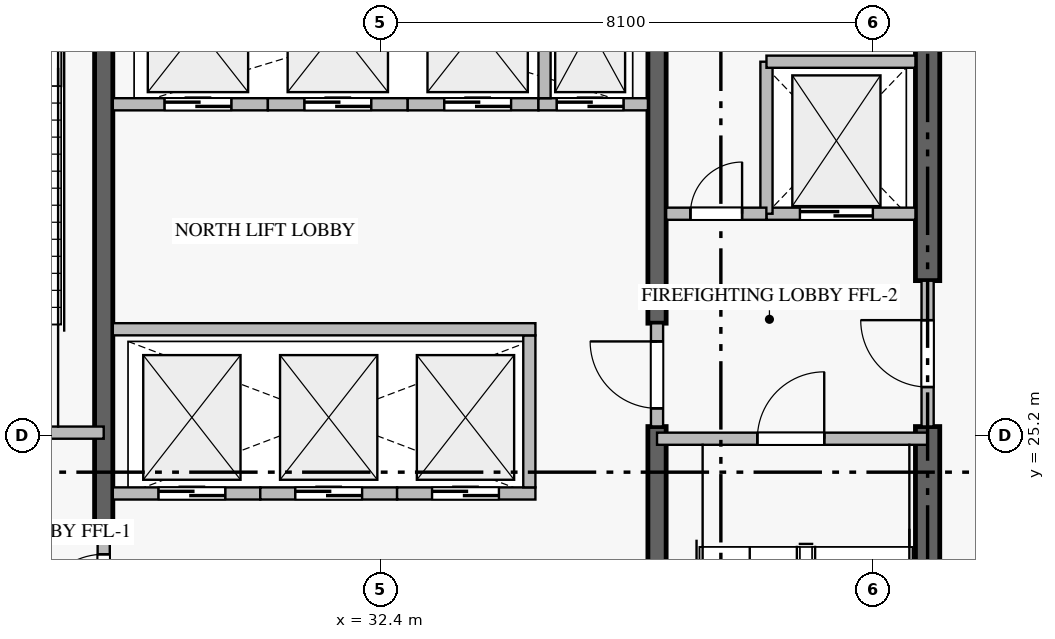
"""IFC4 building model, lengths in metres.
Left out: names, types, materials, properties, quantities, classifications, styles, units other than length and angle.
Written with IfcOpenShell. Run it as: python <this file> out.ifc"""

import sys

from ifc_helpers import new_model, si_unit, direction, frame, frame_2d, origin, place, context, subcontext, project, spatial, rectangle, extrude, source, transform, mapped, element, fill, save


model = new_model("IFC4")
c1 = context("Model", 3, precision=1e-05, world=origin(), true_north=direction((0.0, 1.0)))
c2 = subcontext(c1, "Body", "Model", "MODEL_VIEW")
j1 = project(units=[si_unit("LENGTHUNIT", "METRE"), si_unit("PLANEANGLEUNIT", "RADIAN")], contexts=[c1])
p1 = place(None, origin())
s1 = spatial("IfcSite", under=j1, at=p1, CompositionType="ELEMENT")
p2 = place(p1, origin())
s2 = spatial("IfcBuilding", under=s1, at=p2, CompositionType="ELEMENT")
p3 = place(p2, frame((0.0, 0.0, 204.9)))
s3 = spatial("IfcBuildingStorey", under=s2, at=p3, CompositionType="ELEMENT", Elevation=204.9)
p4 = place(p3, frame((41.4, 17.0, -0.36), z_axis=(0.0, 0.0, 1.0), x_axis=(0.0, 1.0, 0.0)))
e1 = element("IfcWall", 1, at=p4, inside=s3, PredefinedType="SHEAR", context=c2, shape_type="SweptSolid", body=[
    extrude(rectangle(XDim=8.35, YDim=0.4, at=frame_2d((4.175, 0.0))), origin(), (0.0, 0.0, 1.0), 5.468),
])
p5 = place(p3, frame((41.4, 27.75, -0.36), z_axis=(0.0, 0.0, 1.0), x_axis=(0.0, 1.0, 0.0)))
e2 = element("IfcWall", 2, at=p5, inside=s3, PredefinedType="SHEAR", context=c2, shape_type="SweptSolid", body=[
    extrude(rectangle(XDim=5.65, YDim=0.4, at=frame_2d((2.825, 0.0))), origin(), (0.0, 0.0, 1.0), 5.468),
])
p6 = place(p3, frame((27.85, 23.55, -0.36), z_axis=(0.0, 0.0, 1.0), x_axis=(0.0, 1.0, 0.0)))
e3 = element("IfcWall", 3, at=p6, inside=s3, PredefinedType="SHEAR", context=c2, shape_type="SweptSolid", body=[
    extrude(rectangle(XDim=9.85, YDim=0.3, at=frame_2d((4.925, 0.0))), origin(), (0.0, 0.0, 1.0), 5.468),
])
p7 = place(p3, frame((36.95, 17.0, -0.36), z_axis=(0.0, 0.0, 1.0), x_axis=(0.0, 1.0, 0.0)))
e4 = element("IfcWall", 4, at=p7, inside=s3, PredefinedType="SHEAR", context=c2, shape_type="SweptSolid", body=[
    extrude(rectangle(XDim=8.35, YDim=0.3, at=frame_2d((4.175, 0.0))), origin(), (0.0, 0.0, 1.0), 5.468),
])
p8 = place(p3, frame((36.95, 27.05, -0.36), z_axis=(0.0, 0.0, 1.0), x_axis=(0.0, 1.0, 0.0)))
e5 = element("IfcWall", 5, at=p8, inside=s3, PredefinedType="SHEAR", context=c2, shape_type="SweptSolid", body=[
    extrude(rectangle(XDim=6.35, YDim=0.3, at=frame_2d((3.175, 0.0))), origin(), (0.0, 0.0, 1.0), 5.468),
])
p9 = place(p3, frame((23.4, 25.25, 0.0), z_axis=(0.0, 0.0, 1.0), x_axis=(1.0, 0.0, 0.0)))
e6 = element("IfcWall", 6, at=p9, inside=s3, PredefinedType="STANDARD", context=c2, shape_type="SweptSolid", body=[
    extrude(rectangle(XDim=4.45, YDim=0.2, at=frame_2d((2.225, 0.0))), origin(), (0.0, 0.0, 1.0), 5.11),
])
p10 = place(p9, frame((1.65, 0.0, 0.0)))
e7 = element("IfcOpeningElement", 7, at=p10, cuts=e6, PredefinedType="OPENING", context=c2, shape_type="SweptSolid", body=[
    extrude(rectangle(XDim=1.1, YDim=2.15, at=frame_2d((0.55, 1.075))), frame((0.0, 0.11, 0.0), z_axis=(0.0, -1.0, 0.0), x_axis=(1.0, 0.0, 0.0)), (0.0, 0.0, 1.0), 0.22),
])
p11 = place(p3, frame((36.95, 25.15, 0.0), z_axis=(0.0, 0.0, 1.0), x_axis=(1.0, 0.0, 0.0)))
e8 = element("IfcWall", 8, at=p11, inside=s3, PredefinedType="STANDARD", context=c2, shape_type="SweptSolid", body=[
    extrude(rectangle(XDim=4.45, YDim=0.2, at=frame_2d((2.225, 0.0))), origin(), (0.0, 0.0, 1.0), 5.11),
])
p12 = place(p11, frame((1.65, 0.0, 0.0)))
e9 = element("IfcOpeningElement", 9, at=p12, cuts=e8, PredefinedType="OPENING", context=c2, shape_type="SweptSolid", body=[
    extrude(rectangle(XDim=1.1, YDim=2.15, at=frame_2d((0.55, 1.075))), frame((0.0, 0.11, 0.0), z_axis=(0.0, -1.0, 0.0), x_axis=(1.0, 0.0, 0.0)), (0.0, 0.0, 1.0), 0.22),
])
p13 = place(p3, frame((38.75, 28.85, 0.0), z_axis=(0.0, 0.0, 1.0), x_axis=(1.0, 0.0, 0.0)))
e10 = element("IfcWall", 10, at=p13, inside=s3, PredefinedType="STANDARD", context=c2, shape_type="SweptSolid", body=[
    extrude(rectangle(XDim=2.45, YDim=0.2, at=frame_2d((1.225, 0.0))), origin(), (0.0, 0.0, 1.0), 5.11),
])
p14 = place(p13, frame((0.55, 0.0, 0.0)))
e11 = element("IfcOpeningElement", 11, at=p14, cuts=e10, PredefinedType="OPENING", context=c2, shape_type="SweptSolid", body=[
    extrude(rectangle(XDim=1.2, YDim=2.2, at=frame_2d((0.6, 1.1))), frame((0.0, 0.11, 0.0), z_axis=(0.0, -1.0, 0.0), x_axis=(1.0, 0.0, 0.0)), (0.0, 0.0, 1.0), 0.22),
])
p15 = place(p3, frame((28.0, 24.25, 0.0), z_axis=(0.0, 0.0, 1.0), x_axis=(1.0, 0.0, 0.0)))
e12 = element("IfcWall", 12, at=p15, inside=s3, PredefinedType="STANDARD", context=c2, shape_type="SweptSolid", body=[
    extrude(rectangle(XDim=2.425, YDim=0.2, at=frame_2d((1.212, 0.0))), origin(), (0.0, 0.0, 1.0), 5.11),
])
p16 = place(p15, frame((0.75, 0.0, 0.0)))
e13 = element("IfcOpeningElement", 13, at=p16, cuts=e12, PredefinedType="OPENING", context=c2, shape_type="SweptSolid", body=[
    extrude(rectangle(XDim=1.1, YDim=2.2, at=frame_2d((0.55, 1.1))), frame((0.0, 0.11, 0.0), z_axis=(0.0, -1.0, 0.0), x_axis=(1.0, 0.0, 0.0)), (0.0, 0.0, 1.0), 0.22),
])
p17 = place(p3, frame((30.425, 24.25, 0.0), z_axis=(0.0, 0.0, 1.0), x_axis=(1.0, 0.0, 0.0)))
e14 = element("IfcWall", 14, at=p17, inside=s3, PredefinedType="STANDARD", context=c2, shape_type="SweptSolid", body=[
    extrude(rectangle(XDim=2.25, YDim=0.2, at=frame_2d((1.125, 0.0))), origin(), (0.0, 0.0, 1.0), 5.11),
])
p18 = place(p17, frame((0.575, 0.0, 0.0)))
e15 = element("IfcOpeningElement", 15, at=p18, cuts=e14, PredefinedType="OPENING", context=c2, shape_type="SweptSolid", body=[
    extrude(rectangle(XDim=1.1, YDim=2.2, at=frame_2d((0.55, 1.1))), frame((0.0, 0.11, 0.0), z_axis=(0.0, -1.0, 0.0), x_axis=(1.0, 0.0, 0.0)), (0.0, 0.0, 1.0), 0.22),
])
p19 = place(p3, frame((32.675, 24.25, 0.0), z_axis=(0.0, 0.0, 1.0), x_axis=(1.0, 0.0, 0.0)))
e16 = element("IfcWall", 16, at=p19, inside=s3, PredefinedType="STANDARD", context=c2, shape_type="SweptSolid", body=[
    extrude(rectangle(XDim=2.275, YDim=0.2, at=frame_2d((1.137, 0.0))), origin(), (0.0, 0.0, 1.0), 5.11),
])
p20 = place(p19, frame((0.575, 0.0, 0.0)))
e17 = element("IfcOpeningElement", 17, at=p20, cuts=e16, PredefinedType="OPENING", context=c2, shape_type="SweptSolid", body=[
    extrude(rectangle(XDim=1.1, YDim=2.2, at=frame_2d((0.55, 1.1))), frame((0.0, 0.11, 0.0), z_axis=(0.0, -1.0, 0.0), x_axis=(1.0, 0.0, 0.0)), (0.0, 0.0, 1.0), 0.22),
])
p21 = place(p3, frame((34.85, 24.35, 0.0), z_axis=(0.0, 0.0, 1.0), x_axis=(0.0, 1.0, 0.0)))
e18 = element("IfcWall", 18, at=p21, inside=s3, PredefinedType="STANDARD", context=c2, shape_type="SweptSolid", body=[
    extrude(rectangle(XDim=2.5, YDim=0.2, at=frame_2d((1.25, 0.0))), origin(), (0.0, 0.0, 1.0), 5.11),
])
p22 = place(p3, frame((28.0, 30.65, 0.0), z_axis=(0.0, 0.0, 1.0), x_axis=(1.0, 0.0, 0.0)))
e19 = element("IfcWall", 19, at=p22, inside=s3, PredefinedType="STANDARD", context=c2, shape_type="SweptSolid", body=[
    extrude(rectangle(XDim=2.55, YDim=0.2, at=frame_2d((1.275, 0.0))), origin(), (0.0, 0.0, 1.0), 5.11),
])
p23 = place(p22, frame((0.85, 0.0, 0.0)))
e20 = element("IfcOpeningElement", 20, at=p23, cuts=e19, PredefinedType="OPENING", context=c2, shape_type="SweptSolid", body=[
    extrude(rectangle(XDim=1.1, YDim=2.2, at=frame_2d((0.55, 1.1))), frame((0.0, 0.11, 0.0), z_axis=(0.0, -1.0, 0.0), x_axis=(1.0, 0.0, 0.0)), (0.0, 0.0, 1.0), 0.22),
])
p24 = place(p3, frame((30.55, 30.65, 0.0), z_axis=(0.0, 0.0, 1.0), x_axis=(1.0, 0.0, 0.0)))
e21 = element("IfcWall", 21, at=p24, inside=s3, PredefinedType="STANDARD", context=c2, shape_type="SweptSolid", body=[
    extrude(rectangle(XDim=2.3, YDim=0.2, at=frame_2d((1.15, 0.0))), origin(), (0.0, 0.0, 1.0), 5.11),
])
p25 = place(p24, frame((0.6, 0.0, 0.0)))
e22 = element("IfcOpeningElement", 22, at=p25, cuts=e21, PredefinedType="OPENING", context=c2, shape_type="SweptSolid", body=[
    extrude(rectangle(XDim=1.1, YDim=2.2, at=frame_2d((0.55, 1.1))), frame((0.0, 0.11, 0.0), z_axis=(0.0, -1.0, 0.0), x_axis=(1.0, 0.0, 0.0)), (0.0, 0.0, 1.0), 0.22),
])
p26 = place(p3, frame((32.85, 30.65, 0.0), z_axis=(0.0, 0.0, 1.0), x_axis=(1.0, 0.0, 0.0)))
e23 = element("IfcWall", 23, at=p26, inside=s3, PredefinedType="STANDARD", context=c2, shape_type="SweptSolid", body=[
    extrude(rectangle(XDim=2.15, YDim=0.2, at=frame_2d((1.075, 0.0))), origin(), (0.0, 0.0, 1.0), 5.11),
])
p27 = place(p26, frame((0.6, 0.0, 0.0)))
e24 = element("IfcOpeningElement", 24, at=p27, cuts=e23, PredefinedType="OPENING", context=c2, shape_type="SweptSolid", body=[
    extrude(rectangle(XDim=1.1, YDim=2.2, at=frame_2d((0.55, 1.1))), frame((0.0, 0.11, 0.0), z_axis=(0.0, -1.0, 0.0), x_axis=(1.0, 0.0, 0.0)), (0.0, 0.0, 1.0), 0.22),
])
p28 = place(p3, frame((35.0, 30.65, 0.0), z_axis=(0.0, 0.0, 1.0), x_axis=(1.0, 0.0, 0.0)))
e25 = element("IfcWall", 25, at=p28, inside=s3, PredefinedType="STANDARD", context=c2, shape_type="SweptSolid", body=[
    extrude(rectangle(XDim=1.8, YDim=0.2, at=frame_2d((0.9, 0.0))), origin(), (0.0, 0.0, 1.0), 5.11),
])
p29 = place(p28, frame((0.3, 0.0, 0.0)))
e26 = element("IfcOpeningElement", 26, at=p29, cuts=e25, PredefinedType="OPENING", context=c2, shape_type="SweptSolid", body=[
    extrude(rectangle(XDim=1.1, YDim=2.2, at=frame_2d((0.55, 1.1))), frame((0.0, 0.11, 0.0), z_axis=(0.0, -1.0, 0.0), x_axis=(1.0, 0.0, 0.0)), (0.0, 0.0, 1.0), 0.22),
])
p30 = place(p3, frame((35.1, 30.75, 0.0), z_axis=(0.0, 0.0, 1.0), x_axis=(0.0, 1.0, 0.0)))
e27 = element("IfcWall", 27, at=p30, inside=s3, PredefinedType="STANDARD", context=c2, shape_type="SweptSolid", body=[
    extrude(rectangle(XDim=2.65, YDim=0.2, at=frame_2d((1.325, 0.0))), origin(), (0.0, 0.0, 1.0), 5.11),
])
p31 = place(p3, frame((38.75, 28.85, 0.0), z_axis=(0.0, 0.0, 1.0), x_axis=(0.0, 1.0, 0.0)))
e28 = element("IfcWall", 28, at=p31, inside=s3, PredefinedType="STANDARD", context=c2, shape_type="SweptSolid", body=[
    extrude(rectangle(XDim=2.5, YDim=0.2, at=frame_2d((1.25, 0.0))), origin(), (0.0, 0.0, 1.0), 5.11),
])
p32 = place(p3, frame((38.75, 31.35, 0.0), z_axis=(0.0, 0.0, 1.0), x_axis=(1.0, 0.0, 0.0)))
e29 = element("IfcWall", 29, at=p32, inside=s3, PredefinedType="STANDARD", context=c2, shape_type="SweptSolid", body=[
    extrude(rectangle(XDim=2.45, YDim=0.2, at=frame_2d((1.225, 0.0))), origin(), (0.0, 0.0, 1.0), 5.11),
])
p33 = place(p3, frame((37.1, 28.85, 0.0), z_axis=(0.0, 0.0, 1.0), x_axis=(1.0, 0.0, 0.0)))
e30 = element("IfcWall", 30, at=p33, inside=s3, PredefinedType="STANDARD", context=c2, shape_type="SweptSolid", body=[
    extrude(rectangle(XDim=1.648, YDim=0.2, at=frame_2d((0.824, 0.0))), origin(), (0.0, 0.0, 1.0), 5.11),
])
p34 = place(p33, frame((0.399, 0.0, 0.0)))
e31 = element("IfcOpeningElement", 31, at=p34, cuts=e30, PredefinedType="OPENING", context=c2, shape_type="SweptSolid", body=[
    extrude(rectangle(XDim=0.85, YDim=2.1, at=frame_2d((0.425, 1.05))), frame((0.0, 0.11, 0.0), z_axis=(0.0, -1.0, 0.0), x_axis=(1.0, 0.0, 0.0)), (0.0, 0.0, 1.0), 0.22),
])
p35 = place(p3, frame((41.4, 25.352, 0.0), z_axis=(0.0, 0.0, 1.0), x_axis=(0.0, 1.0, 0.0)))
e32 = element("IfcWall", 32, at=p35, inside=s3, PredefinedType="STANDARD", context=c2, shape_type="SweptSolid", body=[
    extrude(rectangle(XDim=2.396, YDim=0.2, at=frame_2d((1.198, 0.0))), origin(), (0.0, 0.0, 1.0), 5.11),
])
p36 = place(p35, frame((0.648, 0.0, 0.0)))
e33 = element("IfcOpeningElement", 33, at=p36, cuts=e32, PredefinedType="OPENING", context=c2, shape_type="SweptSolid", body=[
    extrude(rectangle(XDim=1.1, YDim=2.15, at=frame_2d((0.55, 1.075))), frame((0.0, 0.11, 0.0), z_axis=(0.0, -1.0, 0.0), x_axis=(1.0, 0.0, 0.0)), (0.0, 0.0, 1.0), 0.22),
])
p37 = place(p3, frame((27.85, 21.852, 0.0), z_axis=(0.0, 0.0, 1.0), x_axis=(0.0, 1.0, 0.0)))
e34 = element("IfcWall", 34, at=p37, inside=s3, PredefinedType="STANDARD", context=c2, shape_type="SweptSolid", body=[
    extrude(rectangle(XDim=1.696, YDim=0.2, at=frame_2d((0.848, 0.0))), origin(), (0.0, 0.0, 1.0), 5.11),
])
p38 = place(p37, frame((0.298, 0.0, 0.0)))
e35 = element("IfcOpeningElement", 35, at=p38, cuts=e34, PredefinedType="OPENING", context=c2, shape_type="SweptSolid", body=[
    extrude(rectangle(XDim=1.1, YDim=2.15, at=frame_2d((0.55, 1.075))), frame((0.0, 0.11, 0.0), z_axis=(0.0, -1.0, 0.0), x_axis=(1.0, 0.0, 0.0)), (0.0, 0.0, 1.0), 0.22),
])
p39 = place(p3, frame((36.95, 25.352, 0.0), z_axis=(0.0, 0.0, 1.0), x_axis=(0.0, 1.0, 0.0)))
e36 = element("IfcWall", 36, at=p39, inside=s3, PredefinedType="STANDARD", context=c2, shape_type="SweptSolid", body=[
    extrude(rectangle(XDim=1.696, YDim=0.2, at=frame_2d((0.848, 0.0))), origin(), (0.0, 0.0, 1.0), 5.11),
])
p40 = place(p39, frame((0.298, 0.0, 0.0)))
e37 = element("IfcOpeningElement", 37, at=p40, cuts=e36, PredefinedType="OPENING", context=c2, shape_type="SweptSolid", body=[
    extrude(rectangle(XDim=1.1, YDim=2.15, at=frame_2d((0.55, 1.075))), frame((0.0, 0.11, 0.0), z_axis=(0.0, -1.0, 0.0), x_axis=(1.0, 0.0, 0.0)), (0.0, 0.0, 1.0), 0.22),
])
p41 = place(p3, frame((28.0, 26.95, 0.0), z_axis=(0.0, 0.0, 1.0), x_axis=(1.0, 0.0, 0.0)))
e38 = element("IfcWall", 38, at=p41, inside=s3, PredefinedType="STANDARD", context=c2, shape_type="SweptSolid", body=[
    extrude(rectangle(XDim=6.95, YDim=0.2, at=frame_2d((3.475, 0.0))), origin(), (0.0, 0.0, 1.0), 5.11),
])
m1 = source(origin(), c2, "Body", "SweptSolid", [
    extrude(rectangle(XDim=1.1, YDim=2.15, at=frame_2d((0.55, 1.075))), frame((0.0, 0.025, 0.0), z_axis=(0.0, -1.0, 0.0), x_axis=(1.0, 0.0, 0.0)), (0.0, 0.0, 1.0), 0.05),
])
p42 = place(p12, origin())
e39 = element("IfcDoor", 39, at=p42, inside=s3, OperationType="SINGLE_SWING_RIGHT", PredefinedType="DOOR", context=c2, shape_type="MappedRepresentation", body=[
    mapped(m1, transform((0.0, 0.0, 0.0), scale=1.0)),
])
fill(e9, e39)
m2 = source(origin(), c2, "Body", "SweptSolid", [
    extrude(rectangle(XDim=1.2, YDim=2.2, at=frame_2d((0.6, 1.1))), frame((0.0, 0.025, 0.0), z_axis=(0.0, -1.0, 0.0), x_axis=(1.0, 0.0, 0.0)), (0.0, 0.0, 1.0), 0.05),
])
p43 = place(p14, origin())
e40 = element("IfcDoor", 40, at=p43, inside=s3, OperationType="DOUBLE_DOOR_SLIDING", PredefinedType="DOOR", context=c2, shape_type="MappedRepresentation", body=[
    mapped(m2, transform((0.0, 0.0, 0.0), scale=1.0)),
])
fill(e11, e40)
m3 = source(origin(), c2, "Body", "SweptSolid", [
    extrude(rectangle(XDim=1.1, YDim=2.2, at=frame_2d((0.55, 1.1))), frame((0.0, 0.025, 0.0), z_axis=(0.0, -1.0, 0.0), x_axis=(1.0, 0.0, 0.0)), (0.0, 0.0, 1.0), 0.05),
])
p44 = place(p16, origin())
e41 = element("IfcDoor", 41, at=p44, inside=s3, OperationType="DOUBLE_DOOR_SLIDING", PredefinedType="DOOR", context=c2, shape_type="MappedRepresentation", body=[
    mapped(m3, transform((0.0, 0.0, 0.0), scale=1.0)),
])
fill(e13, e41)
p45 = place(p18, origin())
e42 = element("IfcDoor", 42, at=p45, inside=s3, OperationType="DOUBLE_DOOR_SLIDING", PredefinedType="DOOR", context=c2, shape_type="MappedRepresentation", body=[
    mapped(m3, transform((0.0, 0.0, 0.0), scale=1.0)),
])
fill(e15, e42)
p46 = place(p20, origin())
e43 = element("IfcDoor", 43, at=p46, inside=s3, OperationType="DOUBLE_DOOR_SLIDING", PredefinedType="DOOR", context=c2, shape_type="MappedRepresentation", body=[
    mapped(m3, transform((0.0, 0.0, 0.0), scale=1.0)),
])
fill(e17, e43)
p47 = place(p23, origin())
e44 = element("IfcDoor", 44, at=p47, inside=s3, OperationType="DOUBLE_DOOR_SLIDING", PredefinedType="DOOR", context=c2, shape_type="MappedRepresentation", body=[
    mapped(m3, transform((0.0, 0.0, 0.0), scale=1.0)),
])
fill(e20, e44)
p48 = place(p25, origin())
e45 = element("IfcDoor", 45, at=p48, inside=s3, OperationType="DOUBLE_DOOR_SLIDING", PredefinedType="DOOR", context=c2, shape_type="MappedRepresentation", body=[
    mapped(m3, transform((0.0, 0.0, 0.0), scale=1.0)),
])
fill(e22, e45)
p49 = place(p27, origin())
e46 = element("IfcDoor", 46, at=p49, inside=s3, OperationType="DOUBLE_DOOR_SLIDING", PredefinedType="DOOR", context=c2, shape_type="MappedRepresentation", body=[
    mapped(m3, transform((0.0, 0.0, 0.0), scale=1.0)),
])
fill(e24, e46)
p50 = place(p29, origin())
e47 = element("IfcDoor", 47, at=p50, inside=s3, OperationType="DOUBLE_DOOR_SLIDING", PredefinedType="DOOR", context=c2, shape_type="MappedRepresentation", body=[
    mapped(m3, transform((0.0, 0.0, 0.0), scale=1.0)),
])
fill(e26, e47)
m4 = source(origin(), c2, "Body", "SweptSolid", [
    extrude(rectangle(XDim=0.85, YDim=2.1, at=frame_2d((0.425, 1.05))), frame((0.0, 0.025, 0.0), z_axis=(0.0, -1.0, 0.0), x_axis=(1.0, 0.0, 0.0)), (0.0, 0.0, 1.0), 0.05),
])
p51 = place(p34, origin())
e48 = element("IfcDoor", 48, at=p51, inside=s3, OperationType="SINGLE_SWING_RIGHT", PredefinedType="DOOR", context=c2, shape_type="MappedRepresentation", body=[
    mapped(m4, transform((0.0, 0.0, 0.0), scale=1.0)),
])
fill(e31, e48)
p52 = place(p36, origin())
e49 = element("IfcDoor", 49, at=p52, inside=s3, OperationType="SINGLE_SWING_RIGHT", PredefinedType="DOOR", context=c2, shape_type="MappedRepresentation", body=[
    mapped(m1, transform((0.0, 0.0, 0.0), scale=1.0)),
])
fill(e33, e49)
p53 = place(p38, origin())
e50 = element("IfcDoor", 50, at=p53, inside=s3, OperationType="SINGLE_SWING_LEFT", PredefinedType="DOOR", context=c2, shape_type="MappedRepresentation", body=[
    mapped(m1, transform((0.0, 0.0, 0.0), scale=1.0)),
])
fill(e35, e50)
p54 = place(p40, origin())
e51 = element("IfcDoor", 51, at=p54, inside=s3, OperationType="SINGLE_SWING_RIGHT", PredefinedType="DOOR", context=c2, shape_type="MappedRepresentation", body=[
    mapped(m1, transform((0.0, 0.0, 0.0), scale=1.0)),
])
fill(e37, e51)
save(model, sys.argv[1])
